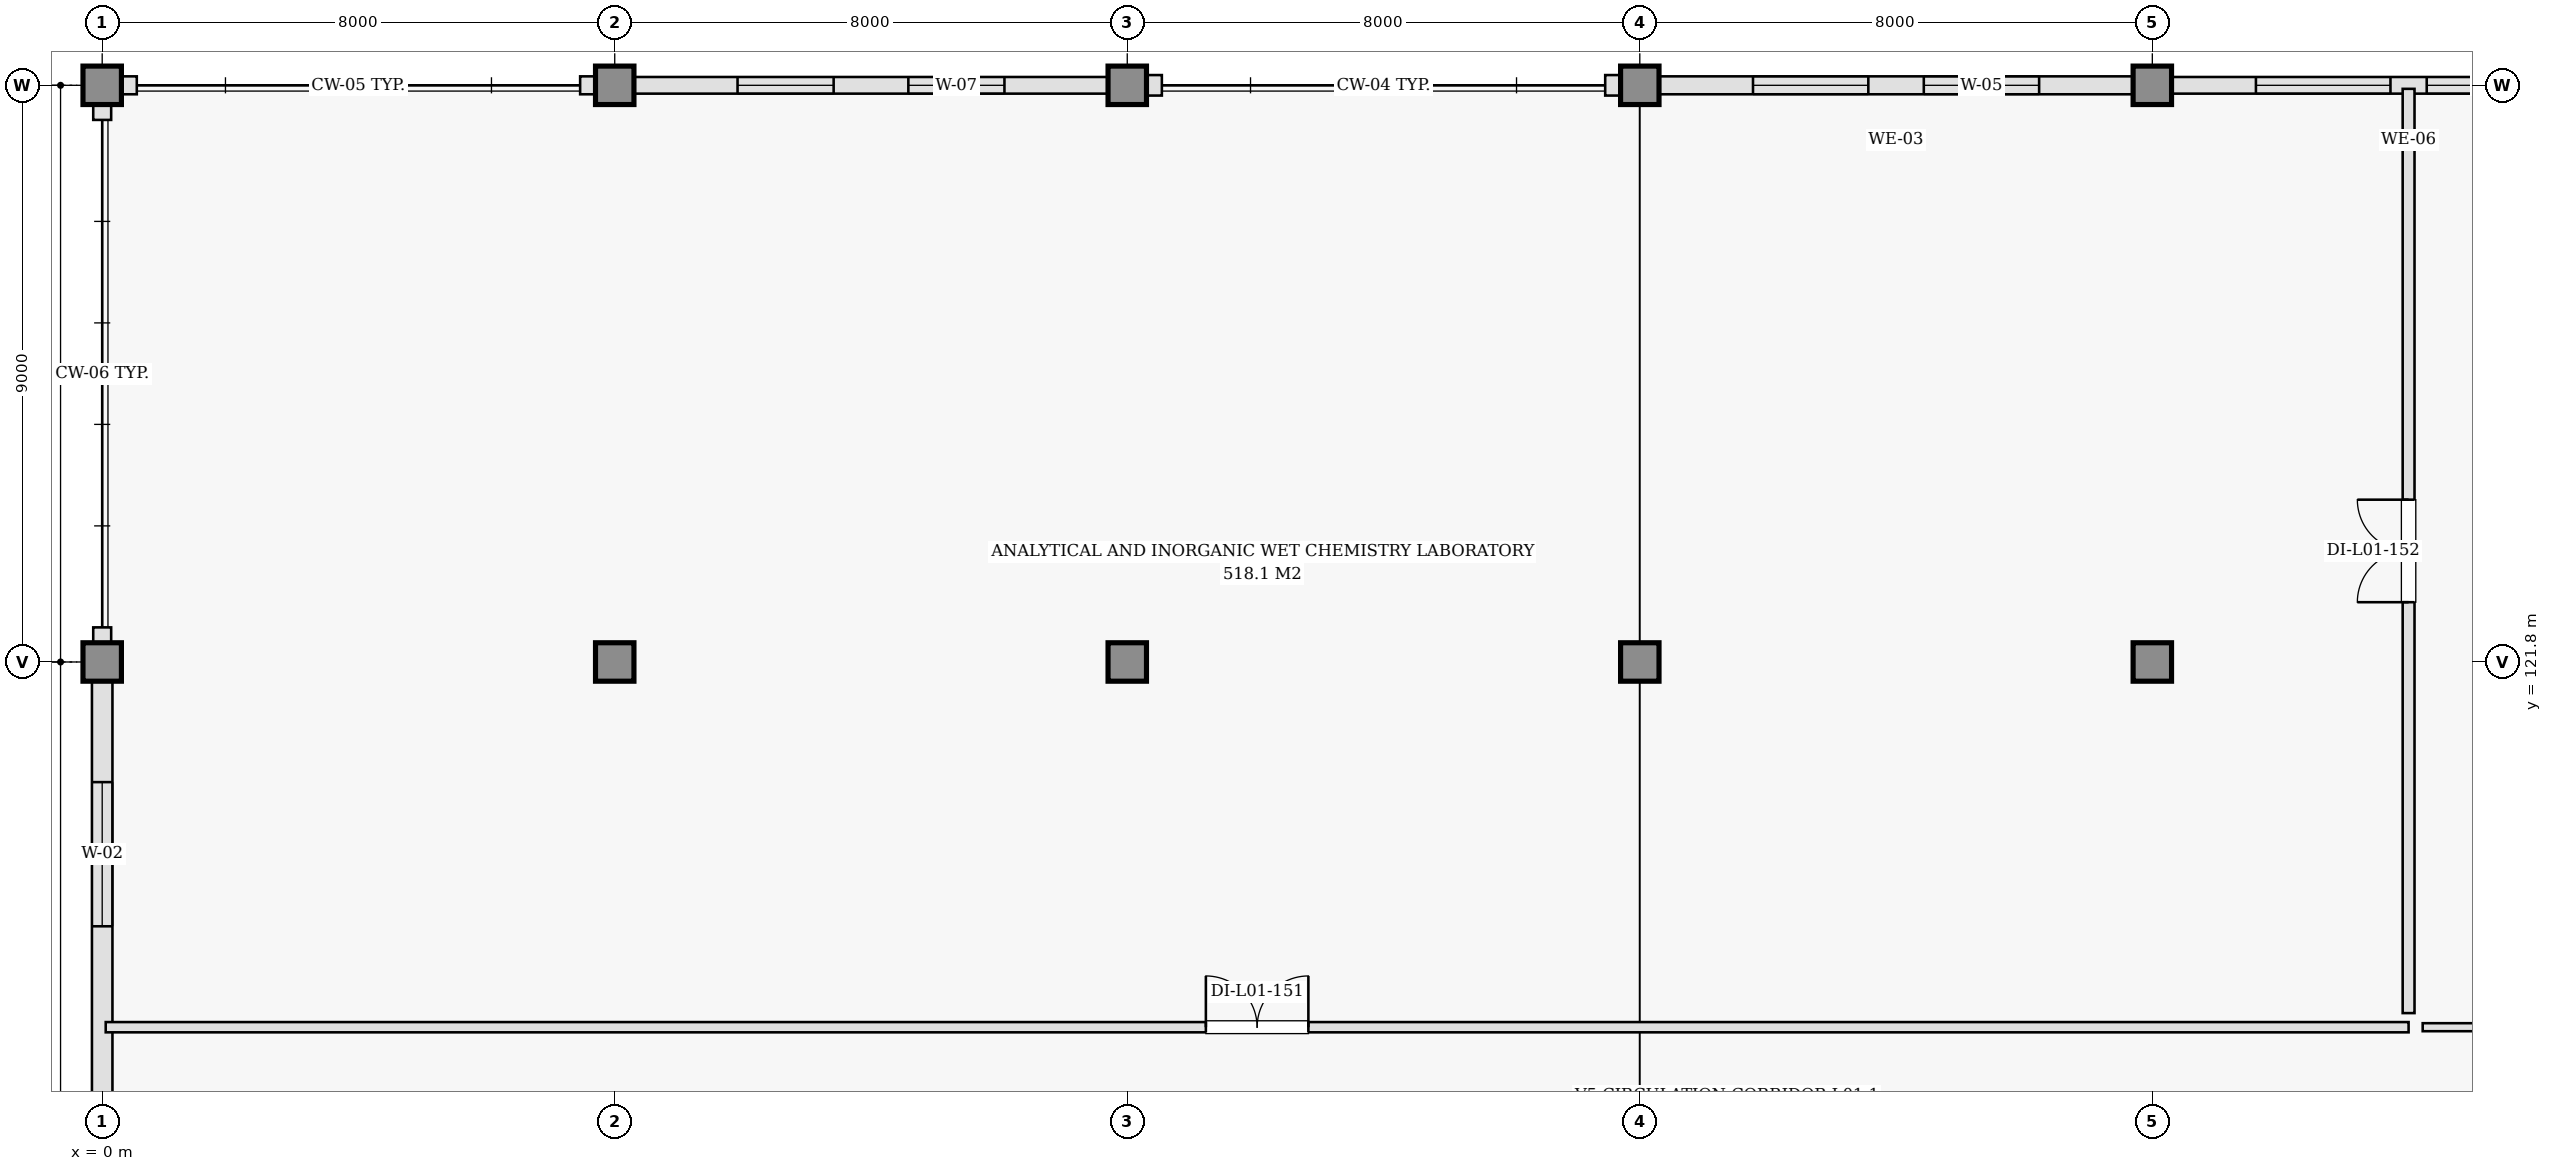
"""IFC4 building model, lengths in metres.
Left out: names, types, materials, properties, quantities, classifications, styles, units other than length and angle.
Written with IfcOpenShell. Run it as: python <this file> out.ifc"""

import sys

from ifc_helpers import new_model, si_unit, direction, frame, frame_2d, origin, origin_2d, place, context, subcontext, project, spatial, rectangle, extrude, element, fill, save


model = new_model("IFC4")
c1 = context("Model", 3, precision=1e-05, world=origin(), true_north=direction((0.0, 1.0)))
c2 = subcontext(c1, "Body", "Model", "MODEL_VIEW")
j1 = project(units=[si_unit("LENGTHUNIT", "METRE"), si_unit("PLANEANGLEUNIT", "RADIAN")], contexts=[c1])
p1 = place(None, origin())
s1 = spatial("IfcSite", under=j1, at=p1, CompositionType="ELEMENT")
p2 = place(p1, origin())
s2 = spatial("IfcBuilding", under=s1, at=p2, CompositionType="ELEMENT")
p3 = place(p2, frame((0.0, 0.0, 4.8)))
s3 = spatial("IfcBuildingStorey", under=s2, at=p3, CompositionType="ELEMENT", Elevation=4.8)
for number, where, z_axis, x_axis in (
    (1, (0.0, 121.8, 0.0), (0.0, 0.0, 1.0), (1.0, 0.0, 0.0)),
    (2, (0.0, 130.8, 0.0), (0.0, 0.0, 1.0), (1.0, 0.0, 0.0)),
    (3, (8.0, 121.8, 0.0), (0.0, 0.0, 1.0), (1.0, 0.0, 0.0)),
    (4, (8.0, 130.8, 0.0), (0.0, 0.0, 1.0), (1.0, 0.0, 0.0)),
    (5, (16.0, 121.8, 0.0), (0.0, 0.0, 1.0), (1.0, 0.0, 0.0)),
    (6, (16.0, 130.8, 0.0), (0.0, 0.0, 1.0), (1.0, 0.0, 0.0)),
    (7, (24.0, 121.8, 0.0), (0.0, 0.0, 1.0), (1.0, 0.0, 0.0)),
    (8, (24.0, 130.8, 0.0), (0.0, 0.0, 1.0), (1.0, 0.0, 0.0)),
    (9, (32.0, 121.8, 0.0), (0.0, 0.0, 1.0), (1.0, 0.0, 0.0)),
    (10, (32.0, 130.8, 0.0), (0.0, 0.0, 1.0), (1.0, 0.0, 0.0)),
):
    element("IfcColumn", number, at=place(p3, frame(where, z_axis=z_axis, x_axis=x_axis)), inside=s3, PredefinedType="COLUMN", context=c2, shape_type="SweptSolid", body=[
        extrude(rectangle(XDim=0.6, YDim=0.6, at=origin_2d()), origin(), (0.0, 0.0, 1.0), 4.8),
    ])
p4 = place(p3, frame((40.0, 130.8, 0.0), z_axis=(0.0, 0.0, 1.0), x_axis=(-1.0, 0.0, 0.0)))
e11 = element("IfcWall", 11, at=p4, inside=s3, PredefinedType="SOLIDWALL", context=c2, shape_type="SweptSolid", body=[
    extrude(rectangle(XDim=8.0, YDim=0.26, at=frame_2d((4.0, 0.0))), origin(), (0.0, 0.0, 1.0), 3.715),
])
p5 = place(p4, frame((1.617, 0.0, 0.95)))
e12 = element("IfcOpeningElement", 12, at=p5, cuts=e11, PredefinedType="OPENING", context=c2, shape_type="SweptSolid", body=[
    extrude(rectangle(XDim=2.1, YDim=1.8, at=frame_2d((1.05, 0.9))), frame((0.0, 0.14, 0.0), z_axis=(0.0, -1.0, 0.0), x_axis=(1.0, 0.0, 0.0)), (0.0, 0.0, 1.0), 0.28),
])
p6 = place(p4, frame((4.283, 0.0, 0.95)))
e13 = element("IfcOpeningElement", 13, at=p6, cuts=e11, PredefinedType="OPENING", context=c2, shape_type="SweptSolid", body=[
    extrude(rectangle(XDim=2.1, YDim=1.8, at=frame_2d((1.05, 0.9))), frame((0.0, 0.14, 0.0), z_axis=(0.0, -1.0, 0.0), x_axis=(1.0, 0.0, 0.0)), (0.0, 0.0, 1.0), 0.28),
])
p7 = place(p3, frame((32.0, 130.8, 0.0), z_axis=(0.0, 0.0, 1.0), x_axis=(-1.0, 0.0, 0.0)))
e14 = element("IfcWall", 14, at=p7, inside=s3, PredefinedType="SOLIDWALL", context=c2, shape_type="SweptSolid", body=[
    extrude(rectangle(XDim=8.0, YDim=0.28, at=frame_2d((4.0, 0.0))), origin(), (0.0, 0.0, 1.0), 3.715),
])
p8 = place(p7, frame((1.767, 0.0, 0.95)))
e15 = element("IfcOpeningElement", 15, at=p8, cuts=e14, PredefinedType="OPENING", context=c2, shape_type="SweptSolid", body=[
    extrude(rectangle(XDim=1.8, YDim=1.75, at=frame_2d((0.9, 0.875))), frame((0.0, 0.15, 0.0), z_axis=(0.0, -1.0, 0.0), x_axis=(1.0, 0.0, 0.0)), (0.0, 0.0, 1.0), 0.3),
])
p9 = place(p7, frame((4.433, 0.0, 0.95)))
e16 = element("IfcOpeningElement", 16, at=p9, cuts=e14, PredefinedType="OPENING", context=c2, shape_type="SweptSolid", body=[
    extrude(rectangle(XDim=1.8, YDim=1.75, at=frame_2d((0.9, 0.875))), frame((0.0, 0.15, 0.0), z_axis=(0.0, -1.0, 0.0), x_axis=(1.0, 0.0, 0.0)), (0.0, 0.0, 1.0), 0.3),
])
for number, where, z_axis, x_axis in (
    (17, (24.0, 130.8, 0.0), (0.0, 0.0, 1.0), (-1.0, 0.0, 0.0)),
    (18, (16.54, 130.8, 0.0), (0.0, 0.0, 1.0), (-1.0, 0.0, 0.0)),
):
    element("IfcWall", number, at=place(p3, frame(where, z_axis=z_axis, x_axis=x_axis)), inside=s3, PredefinedType="SOLIDWALL", context=c2, shape_type="SweptSolid", body=[
        extrude(rectangle(XDim=0.54, YDim=0.32, at=frame_2d((0.27, 0.0))), origin(), (0.0, 0.0, 1.0), 3.715),
    ])
p10 = place(p3, frame((16.0, 130.8, 0.0), z_axis=(0.0, 0.0, 1.0), x_axis=(-1.0, 0.0, 0.0)))
e19 = element("IfcWall", 19, at=p10, inside=s3, PredefinedType="SOLIDWALL", context=c2, shape_type="SweptSolid", body=[
    extrude(rectangle(XDim=8.0, YDim=0.26, at=frame_2d((4.0, 0.0))), origin(), (0.0, 0.0, 1.0), 3.715),
])
p11 = place(p10, frame((1.917, 0.0, 0.95)))
e20 = element("IfcOpeningElement", 20, at=p11, cuts=e19, PredefinedType="OPENING", context=c2, shape_type="SweptSolid", body=[
    extrude(rectangle(XDim=1.5, YDim=1.65, at=frame_2d((0.75, 0.825))), frame((0.0, 0.14, 0.0), z_axis=(0.0, -1.0, 0.0), x_axis=(1.0, 0.0, 0.0)), (0.0, 0.0, 1.0), 0.28),
])
p12 = place(p10, frame((4.583, 0.0, 0.95)))
e21 = element("IfcOpeningElement", 21, at=p12, cuts=e19, PredefinedType="OPENING", context=c2, shape_type="SweptSolid", body=[
    extrude(rectangle(XDim=1.5, YDim=1.65, at=frame_2d((0.75, 0.825))), frame((0.0, 0.14, 0.0), z_axis=(0.0, -1.0, 0.0), x_axis=(1.0, 0.0, 0.0)), (0.0, 0.0, 1.0), 0.28),
])
for number, where, z_axis, x_axis in (
    (22, (8.0, 130.8, 0.0), (0.0, 0.0, 1.0), (-1.0, 0.0, 0.0)),
    (23, (0.54, 130.8, 0.0), (0.0, 0.0, 1.0), (-1.0, 0.0, 0.0)),
):
    element("IfcWall", number, at=place(p3, frame(where, z_axis=z_axis, x_axis=x_axis)), inside=s3, PredefinedType="SOLIDWALL", context=c2, shape_type="SweptSolid", body=[
        extrude(rectangle(XDim=0.54, YDim=0.28, at=frame_2d((0.27, 0.0))), origin(), (0.0, 0.0, 1.0), 3.715),
    ])
p13 = place(p3, frame((0.0, 130.658, 0.0), z_axis=(0.0, 0.0, 1.0), x_axis=(0.0, -1.0, 0.0)))
e24 = element("IfcWall", 24, at=p13, inside=s3, PredefinedType="SOLIDWALL", context=c2, shape_type="SweptSolid", body=[
    extrude(rectangle(XDim=0.398, YDim=0.28, at=frame_2d((0.199, 0.0))), origin(), (0.0, 0.0, 1.0), 3.715),
])
p14 = place(p3, frame((0.0, 122.34, 0.0), z_axis=(0.0, 0.0, 1.0), x_axis=(0.0, -1.0, 0.0)))
e25 = element("IfcWall", 25, at=p14, inside=s3, PredefinedType="SOLIDWALL", context=c2, shape_type="SweptSolid", body=[
    extrude(rectangle(XDim=0.54, YDim=0.28, at=frame_2d((0.27, 0.0))), origin(), (0.0, 0.0, 1.0), 3.715),
])
p15 = place(p3, frame((0.0, 121.8, 0.0), z_axis=(0.0, 0.0, 1.0), x_axis=(0.0, -1.0, 0.0)))
e26 = element("IfcWall", 26, at=p15, inside=s3, PredefinedType="SOLIDWALL", context=c2, shape_type="SweptSolid", body=[
    extrude(rectangle(XDim=9.0, YDim=0.32, at=frame_2d((4.5, 0.0))), origin(), (0.0, 0.0, 1.0), 3.715),
])
p16 = place(p15, frame((1.875, 0.0, 0.95)))
e27 = element("IfcOpeningElement", 27, at=p16, cuts=e26, PredefinedType="OPENING", context=c2, shape_type="SweptSolid", body=[
    extrude(rectangle(XDim=2.25, YDim=1.8, at=frame_2d((1.125, 0.9))), frame((0.0, 0.17, 0.0), z_axis=(0.0, -1.0, 0.0), x_axis=(1.0, 0.0, 0.0)), (0.0, 0.0, 1.0), 0.34),
])
p17 = place(p3, frame((0.055, 116.1, 0.0), z_axis=(0.0, 0.0, 1.0), x_axis=(1.0, 0.0, 0.0)))
e28 = element("IfcWall", 28, at=p17, inside=s3, PredefinedType="PARTITIONING", context=c2, shape_type="SweptSolid", body=[
    extrude(rectangle(XDim=35.945, YDim=0.16, at=frame_2d((17.973, 0.0))), origin(), (0.0, 0.0, 1.0), 3.815),
])
p18 = place(p17, frame((17.172, 0.0, 0.0)))
e29 = element("IfcOpeningElement", 29, at=p18, cuts=e28, PredefinedType="OPENING", context=c2, shape_type="SweptSolid", body=[
    extrude(rectangle(XDim=1.6, YDim=2.2, at=frame_2d((0.8, 1.1))), frame((0.0, 0.09, 0.0), z_axis=(0.0, -1.0, 0.0), x_axis=(1.0, 0.0, 0.0)), (0.0, 0.0, 1.0), 0.18),
])
p19 = place(p3, frame((36.0, 116.32, 0.0), z_axis=(0.0, 0.0, 1.0), x_axis=(0.0, 1.0, 0.0)))
e30 = element("IfcWall", 30, at=p19, inside=s3, PredefinedType="PARTITIONING", context=c2, shape_type="SweptSolid", body=[
    extrude(rectangle(XDim=14.425, YDim=0.185, at=frame_2d((7.212, 0.0))), origin(), (0.0, 0.0, 1.0), 3.715),
])
p20 = place(p19, frame((6.413, 0.0, 0.0)))
e31 = element("IfcOpeningElement", 31, at=p20, cuts=e30, PredefinedType="OPENING", context=c2, shape_type="SweptSolid", body=[
    extrude(rectangle(XDim=1.6, YDim=2.2, at=frame_2d((0.8, 1.1))), frame((0.0, 0.103, 0.0), z_axis=(0.0, -1.0, 0.0), x_axis=(1.0, 0.0, 0.0)), (0.0, 0.0, 1.0), 0.205),
])
p21 = place(p3, frame((36.22, 116.1, 0.0), z_axis=(0.0, 0.0, 1.0), x_axis=(1.0, 0.0, 0.0)))
e32 = element("IfcWall", 32, at=p21, inside=s3, PredefinedType="PARTITIONING", context=c2, shape_type="SweptSolid", body=[
    extrude(rectangle(XDim=39.16, YDim=0.125, at=frame_2d((19.58, 0.0))), origin(), (0.0, 0.0, 1.0), 3.565),
])
p22 = place(p5, origin())
e33 = element("IfcWindow", 33, at=p22, inside=s3, PartitioningType="DOUBLE_PANEL_VERTICAL", PredefinedType="WINDOW", context=c2, shape_type="SweptSolid", body=[
    extrude(rectangle(XDim=2.1, YDim=1.8, at=frame_2d((1.05, 0.9))), frame((0.0, 0.03, 0.0), z_axis=(0.0, -1.0, 0.0), x_axis=(1.0, 0.0, 0.0)), (0.0, 0.0, 1.0), 0.06),
])
fill(e12, e33)
p23 = place(p6, origin())
e34 = element("IfcWindow", 34, at=p23, inside=s3, PartitioningType="DOUBLE_PANEL_VERTICAL", PredefinedType="WINDOW", context=c2, shape_type="SweptSolid", body=[
    extrude(rectangle(XDim=2.1, YDim=1.8, at=frame_2d((1.05, 0.9))), frame((0.0, 0.03, 0.0), z_axis=(0.0, -1.0, 0.0), x_axis=(1.0, 0.0, 0.0)), (0.0, 0.0, 1.0), 0.06),
])
fill(e13, e34)
p24 = place(p8, origin())
e35 = element("IfcWindow", 35, at=p24, inside=s3, PartitioningType="DOUBLE_PANEL_VERTICAL", PredefinedType="WINDOW", context=c2, shape_type="SweptSolid", body=[
    extrude(rectangle(XDim=1.8, YDim=1.75, at=frame_2d((0.9, 0.875))), frame((0.0, 0.03, 0.0), z_axis=(0.0, -1.0, 0.0), x_axis=(1.0, 0.0, 0.0)), (0.0, 0.0, 1.0), 0.06),
])
fill(e15, e35)
p25 = place(p9, origin())
e36 = element("IfcWindow", 36, at=p25, inside=s3, PartitioningType="DOUBLE_PANEL_VERTICAL", PredefinedType="WINDOW", context=c2, shape_type="SweptSolid", body=[
    extrude(rectangle(XDim=1.8, YDim=1.75, at=frame_2d((0.9, 0.875))), frame((0.0, 0.03, 0.0), z_axis=(0.0, -1.0, 0.0), x_axis=(1.0, 0.0, 0.0)), (0.0, 0.0, 1.0), 0.06),
])
fill(e16, e36)
p26 = place(p11, origin())
e37 = element("IfcWindow", 37, at=p26, inside=s3, PartitioningType="DOUBLE_PANEL_VERTICAL", PredefinedType="WINDOW", context=c2, shape_type="SweptSolid", body=[
    extrude(rectangle(XDim=1.5, YDim=1.65, at=frame_2d((0.75, 0.825))), frame((0.0, 0.03, 0.0), z_axis=(0.0, -1.0, 0.0), x_axis=(1.0, 0.0, 0.0)), (0.0, 0.0, 1.0), 0.06),
])
fill(e20, e37)
p27 = place(p12, origin())
e38 = element("IfcWindow", 38, at=p27, inside=s3, PartitioningType="DOUBLE_PANEL_VERTICAL", PredefinedType="WINDOW", context=c2, shape_type="SweptSolid", body=[
    extrude(rectangle(XDim=1.5, YDim=1.65, at=frame_2d((0.75, 0.825))), frame((0.0, 0.03, 0.0), z_axis=(0.0, -1.0, 0.0), x_axis=(1.0, 0.0, 0.0)), (0.0, 0.0, 1.0), 0.06),
])
fill(e21, e38)
p28 = place(p16, origin())
e39 = element("IfcWindow", 39, at=p28, inside=s3, PartitioningType="DOUBLE_PANEL_VERTICAL", PredefinedType="WINDOW", context=c2, shape_type="SweptSolid", body=[
    extrude(rectangle(XDim=2.25, YDim=1.8, at=frame_2d((1.125, 0.9))), frame((0.0, 0.03, 0.0), z_axis=(0.0, -1.0, 0.0), x_axis=(1.0, 0.0, 0.0)), (0.0, 0.0, 1.0), 0.06),
])
fill(e27, e39)
p29 = place(p18, origin())
e40 = element("IfcDoor", 40, at=p29, inside=s3, OperationType="DOUBLE_DOOR_SINGLE_SWING", PredefinedType="DOOR", context=c2, shape_type="SweptSolid", body=[
    extrude(rectangle(XDim=1.6, YDim=2.2, at=frame_2d((0.8, 1.1))), frame((0.0, 0.025, 0.0), z_axis=(0.0, -1.0, 0.0), x_axis=(1.0, 0.0, 0.0)), (0.0, 0.0, 1.0), 0.05),
])
fill(e29, e40)
p30 = place(p20, origin())
e41 = element("IfcDoor", 41, at=p30, inside=s3, OperationType="DOUBLE_DOOR_SINGLE_SWING", PredefinedType="DOOR", context=c2, shape_type="SweptSolid", body=[
    extrude(rectangle(XDim=1.6, YDim=2.2, at=frame_2d((0.8, 1.1))), frame((0.0, 0.025, 0.0), z_axis=(0.0, -1.0, 0.0), x_axis=(1.0, 0.0, 0.0)), (0.0, 0.0, 1.0), 0.05),
])
fill(e31, e41)
save(model, sys.argv[1])
